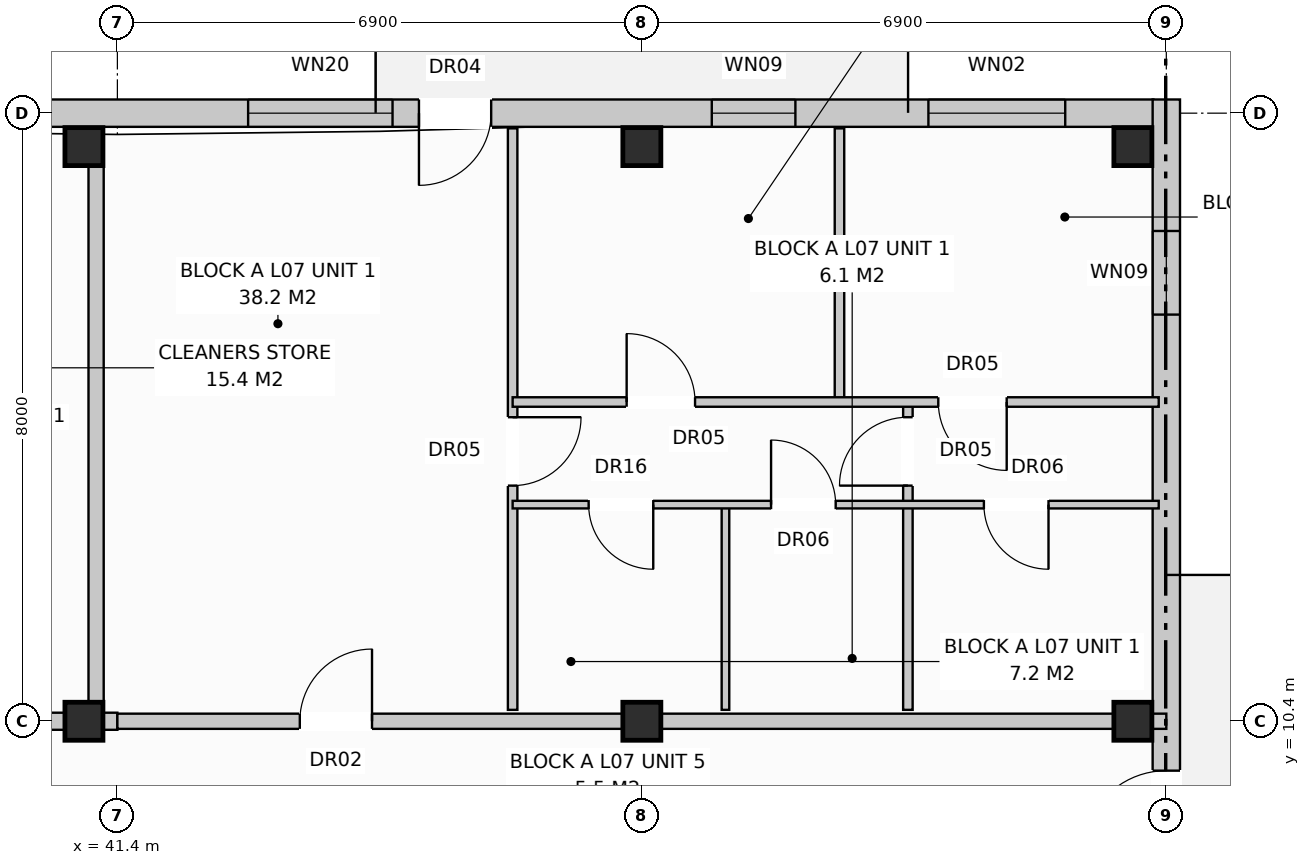
"""IFC4 building model, lengths in metres.
Left out: names, types, materials, properties, quantities, classifications, styles, units other than length and angle.
Written with IfcOpenShell. Run it as: python <this file> out.ifc"""

import sys

from ifc_helpers import new_model, si_unit, direction, frame, frame_2d, origin, origin_with_axes, origin_2d, place, context, subcontext, project, spatial, rectangle, extrude, element, fill, save


model = new_model("IFC4")
c1 = context("Model", 3, precision=1e-05, world=origin(), true_north=direction((0.0, 1.0)))
c2 = subcontext(c1, "Body", "Model", "MODEL_VIEW")
j1 = project(units=[si_unit("LENGTHUNIT", "METRE"), si_unit("PLANEANGLEUNIT", "RADIAN")], contexts=[c1])
p1 = place(None, origin())
s1 = spatial("IfcSite", under=j1, at=p1, CompositionType="ELEMENT")
p2 = place(p1, origin())
s2 = spatial("IfcBuilding", under=s1, at=p2, CompositionType="ELEMENT")
p3 = place(p2, frame((0.0, 0.0, 24.0)))
s3 = spatial("IfcBuildingStorey", under=s2, at=p3, CompositionType="ELEMENT", Elevation=24.0)
for number, where, z_axis, x_axis in (
    (1, (40.96, 10.4, 0.0), (0.0, 0.0, 1.0), (1.0, 0.0, 0.0)),
    (2, (40.96, 17.96, 0.0), (0.0, 0.0, 1.0), (1.0, 0.0, 0.0)),
    (3, (48.3, 10.4, 0.0), (0.0, 0.0, 1.0), (1.0, 0.0, 0.0)),
    (4, (48.3, 17.96, 0.0), (0.0, 0.0, 1.0), (1.0, 0.0, 0.0)),
    (5, (54.76, 10.4, 0.0), (0.0, 0.0, 1.0), (1.0, 0.0, 0.0)),
    (6, (54.76, 17.96, 0.0), (0.0, 0.0, 1.0), (1.0, 0.0, 0.0)),
):
    element("IfcColumn", number, at=place(p3, frame(where, z_axis=z_axis, x_axis=x_axis)), inside=s3, PredefinedType="COLUMN", context=c2, shape_type="SweptSolid", body=[
        extrude(rectangle(XDim=0.5, YDim=0.5, at=origin_2d()), origin(), (0.0, 0.0, 1.0), 3.2),
    ])
p4 = place(p3, frame((31.35, 18.4, 0.0), z_axis=(0.0, 0.0, 1.0), x_axis=(1.0, 0.0, 0.0)))
e7 = element("IfcWall", 7, at=p4, inside=s3, PredefinedType="STANDARD", context=c2, shape_type="SweptSolid", body=[
    extrude(rectangle(XDim=23.68, YDim=0.36, at=frame_2d((11.84, 0.0))), origin(), (0.0, 0.0, 1.0), 2.95),
])
p5 = place(p4, frame((14.018, 0.0, 0.0)))
e8 = element("IfcOpeningElement", 8, at=p5, cuts=e7, PredefinedType="OPENING", context=c2, shape_type="SweptSolid", body=[
    extrude(rectangle(XDim=0.95, YDim=2.1, at=frame_2d((0.475, 1.05))), frame((0.0, 0.192, 0.0), z_axis=(0.0, -1.0, 0.0), x_axis=(1.0, 0.0, 0.0)), (0.0, 0.0, 1.0), 0.384),
])
p6 = place(p4, frame((11.77, 0.0, 0.8)))
e9 = element("IfcOpeningElement", 9, at=p6, cuts=e7, PredefinedType="OPENING", context=c2, shape_type="SweptSolid", body=[
    extrude(rectangle(XDim=1.9, YDim=1.85, at=frame_2d((0.95, 0.925))), frame((0.0, 0.192, 0.0), z_axis=(0.0, -1.0, 0.0), x_axis=(1.0, 0.0, 0.0)), (0.0, 0.0, 1.0), 0.384),
])
p7 = place(p4, frame((17.87, 0.0, 0.72)))
e10 = element("IfcOpeningElement", 10, at=p7, cuts=e7, PredefinedType="OPENING", context=c2, shape_type="SweptSolid", body=[
    extrude(rectangle(XDim=1.1, YDim=1.5, at=frame_2d((0.55, 0.75))), frame((0.0, 0.192, 0.0), z_axis=(0.0, -1.0, 0.0), x_axis=(1.0, 0.0, 0.0)), (0.0, 0.0, 1.0), 0.384),
])
p8 = place(p4, frame((20.72, 0.0, 0.8)))
e11 = element("IfcOpeningElement", 11, at=p8, cuts=e7, PredefinedType="OPENING", context=c2, shape_type="SweptSolid", body=[
    extrude(rectangle(XDim=1.8, YDim=1.7, at=frame_2d((0.9, 0.85))), frame((0.0, 0.192, 0.0), z_axis=(0.0, -1.0, 0.0), x_axis=(1.0, 0.0, 0.0)), (0.0, 0.0, 1.0), 0.384),
])
p9 = place(p3, frame((55.2, -0.18, 0.0), z_axis=(0.0, 0.0, 1.0), x_axis=(0.0, 1.0, 0.0)))
e12 = element("IfcWall", 12, at=p9, inside=s3, PredefinedType="STANDARD", context=c2, shape_type="SweptSolid", body=[
    extrude(rectangle(XDim=18.76, YDim=0.36, at=frame_2d((9.38, 0.0))), origin(), (0.0, 0.0, 1.0), 2.95),
])
p10 = place(p9, frame((8.83, 0.0, 0.0)))
e13 = element("IfcOpeningElement", 13, at=p10, cuts=e12, PredefinedType="OPENING", context=c2, shape_type="SweptSolid", body=[
    extrude(rectangle(XDim=1.1, YDim=2.1, at=frame_2d((0.55, 1.05))), frame((0.0, 0.192, 0.0), z_axis=(0.0, -1.0, 0.0), x_axis=(1.0, 0.0, 0.0)), (0.0, 0.0, 1.0), 0.384),
])
p11 = place(p9, frame((1.73, 0.0, 0.72)))
e14 = element("IfcOpeningElement", 14, at=p11, cuts=e12, PredefinedType="OPENING", context=c2, shape_type="SweptSolid", body=[
    extrude(rectangle(XDim=1.1, YDim=1.5, at=frame_2d((0.55, 0.75))), frame((0.0, 0.192, 0.0), z_axis=(0.0, -1.0, 0.0), x_axis=(1.0, 0.0, 0.0)), (0.0, 0.0, 1.0), 0.384),
])
p12 = place(p9, frame((15.93, 0.0, 0.72)))
e15 = element("IfcOpeningElement", 15, at=p12, cuts=e12, PredefinedType="OPENING", context=c2, shape_type="SweptSolid", body=[
    extrude(rectangle(XDim=1.1, YDim=1.5, at=frame_2d((0.55, 0.75))), frame((0.0, 0.192, 0.0), z_axis=(0.0, -1.0, 0.0), x_axis=(1.0, 0.0, 0.0)), (0.0, 0.0, 1.0), 0.384),
])
p13 = place(p3, frame((41.12, 10.6, 0.0), z_axis=(0.0, 0.0, 1.0), x_axis=(0.0, 1.0, 0.0)))
e16 = element("IfcWall", 16, at=p13, inside=s3, PredefinedType="PARTITIONING", context=c2, shape_type="SweptSolid", body=[
    extrude(rectangle(XDim=7.6, YDim=0.2, at=frame_2d((3.8, 0.0))), origin(), (0.0, 0.0, 1.0), 2.95),
])
p14 = place(p3, frame((31.5, 10.4, 0.0), z_axis=(0.0, 0.0, 1.0), x_axis=(1.0, 0.0, 0.0)))
e17 = element("IfcWall", 17, at=p14, inside=s3, PredefinedType="PARTITIONING", context=c2, shape_type="SweptSolid", body=[
    extrude(rectangle(XDim=9.9, YDim=0.225, at=frame_2d((4.95, 0.0))), origin(), (0.0, 0.0, 1.0), 2.39),
])
p15 = place(p14, frame((0.475, 0.0, 0.0)))
e18 = element("IfcOpeningElement", 18, at=p15, cuts=e17, PredefinedType="OPENING", context=c2, shape_type="SweptSolid", body=[
    extrude(rectangle(XDim=1.1, YDim=2.15, at=frame_2d((0.55, 1.075))), frame((0.0, 0.125, 0.0), z_axis=(0.0, -1.0, 0.0), x_axis=(1.0, 0.0, 0.0)), (0.0, 0.0, 1.0), 0.249),
])
p16 = place(p14, frame((5.75, 0.0, 0.0)))
e19 = element("IfcOpeningElement", 19, at=p16, cuts=e17, PredefinedType="OPENING", context=c2, shape_type="SweptSolid", body=[
    extrude(rectangle(XDim=0.9, YDim=2.1, at=frame_2d((0.45, 1.05))), frame((0.0, 0.125, 0.0), z_axis=(0.0, -1.0, 0.0), x_axis=(1.0, 0.0, 0.0)), (0.0, 0.0, 1.0), 0.249),
])
p17 = place(p14, frame((7.8, 0.0, 0.0)))
e20 = element("IfcOpeningElement", 20, at=p17, cuts=e17, PredefinedType="OPENING", context=c2, shape_type="SweptSolid", body=[
    extrude(rectangle(XDim=0.95, YDim=2.15, at=frame_2d((0.475, 1.075))), frame((0.0, 0.125, 0.0), z_axis=(0.0, -1.0, 0.0), x_axis=(1.0, 0.0, 0.0)), (0.0, 0.0, 1.0), 0.249),
])
p18 = place(p3, frame((41.4, 10.4, 0.0), z_axis=(0.0, 0.0, 1.0), x_axis=(1.0, 0.0, 0.0)))
e21 = element("IfcWall", 21, at=p18, inside=s3, PredefinedType="PARTITIONING", context=c2, shape_type="SweptSolid", body=[
    extrude(rectangle(XDim=13.8, YDim=0.2, at=frame_2d((6.9, 0.0))), origin(), (0.0, 0.0, 1.0), 2.39),
])
p19 = place(p18, frame((2.4, 0.0, 0.0)))
e22 = element("IfcOpeningElement", 22, at=p19, cuts=e21, PredefinedType="OPENING", context=c2, shape_type="SweptSolid", body=[
    extrude(rectangle(XDim=0.95, YDim=2.15, at=frame_2d((0.475, 1.075))), frame((0.0, 0.112, 0.0), z_axis=(0.0, -1.0, 0.0), x_axis=(1.0, 0.0, 0.0)), (0.0, 0.0, 1.0), 0.224),
])
p20 = place(p3, frame((46.6, 10.55, 0.0), z_axis=(0.0, 0.0, 1.0), x_axis=(0.0, 1.0, 0.0)))
e23 = element("IfcWall", 23, at=p20, inside=s3, PredefinedType="PARTITIONING", context=c2, shape_type="SweptSolid", body=[
    extrude(rectangle(XDim=7.65, YDim=0.125, at=frame_2d((3.825, 0.0))), origin(), (0.0, 0.0, 1.0), 2.95),
])
p21 = place(p20, frame((2.95, 0.0, 0.0)))
e24 = element("IfcOpeningElement", 24, at=p21, cuts=e23, PredefinedType="OPENING", context=c2, shape_type="SweptSolid", body=[
    extrude(rectangle(XDim=0.9, YDim=2.1, at=frame_2d((0.45, 1.05))), frame((0.0, 0.074, 0.0), z_axis=(0.0, -1.0, 0.0), x_axis=(1.0, 0.0, 0.0)), (0.0, 0.0, 1.0), 0.149),
])
p22 = place(p3, frame((49.4, 10.55, 0.0), z_axis=(0.0, 0.0, 1.0), x_axis=(0.0, 1.0, 0.0)))
e25 = element("IfcWall", 25, at=p22, inside=s3, PredefinedType="PARTITIONING", context=c2, shape_type="SweptSolid", body=[
    extrude(rectangle(XDim=2.7, YDim=0.1, at=frame_2d((1.35, 0.0))), origin(), (0.0, 0.0, 1.0), 2.95),
])
p23 = place(p3, frame((51.8, 10.55, 0.0), z_axis=(0.0, 0.0, 1.0), x_axis=(0.0, 1.0, 0.0)))
e26 = element("IfcWall", 26, at=p23, inside=s3, PredefinedType="PARTITIONING", context=c2, shape_type="SweptSolid", body=[
    extrude(rectangle(XDim=4.05, YDim=0.125, at=frame_2d((2.025, 0.0))), origin(), (0.0, 0.0, 1.0), 2.95),
])
p24 = place(p23, frame((2.95, 0.0, 0.0)))
e27 = element("IfcOpeningElement", 27, at=p24, cuts=e26, PredefinedType="OPENING", context=c2, shape_type="SweptSolid", body=[
    extrude(rectangle(XDim=0.9, YDim=2.1, at=frame_2d((0.45, 1.05))), frame((0.0, 0.074, 0.0), z_axis=(0.0, -1.0, 0.0), x_axis=(1.0, 0.0, 0.0)), (0.0, 0.0, 1.0), 0.149),
])
p25 = place(p3, frame((50.9, 14.6, 0.0), z_axis=(0.0, 0.0, 1.0), x_axis=(0.0, 1.0, 0.0)))
e28 = element("IfcWall", 28, at=p25, inside=s3, PredefinedType="PARTITIONING", context=c2, shape_type="SweptSolid", body=[
    extrude(rectangle(XDim=3.6, YDim=0.125, at=frame_2d((1.8, 0.0))), origin(), (0.0, 0.0, 1.0), 2.59),
])
p26 = place(p3, frame((46.6, 13.25, 0.0), z_axis=(0.0, 0.0, 1.0), x_axis=(1.0, 0.0, 0.0)))
e29 = element("IfcWall", 29, at=p26, inside=s3, PredefinedType="PARTITIONING", context=c2, shape_type="SweptSolid", body=[
    extrude(rectangle(XDim=8.5, YDim=0.1, at=frame_2d((4.25, 0.0))), origin(), (0.0, 0.0, 1.0), 2.95),
])
p27 = place(p26, frame((1.0, 0.0, 0.0)))
e30 = element("IfcOpeningElement", 30, at=p27, cuts=e29, PredefinedType="OPENING", context=c2, shape_type="SweptSolid", body=[
    extrude(rectangle(XDim=0.85, YDim=2.1, at=frame_2d((0.425, 1.05))), frame((0.0, 0.062, 0.0), z_axis=(0.0, -1.0, 0.0), x_axis=(1.0, 0.0, 0.0)), (0.0, 0.0, 1.0), 0.124),
])
p28 = place(p26, frame((3.4, 0.0, 0.0)))
e31 = element("IfcOpeningElement", 31, at=p28, cuts=e29, PredefinedType="OPENING", context=c2, shape_type="SweptSolid", body=[
    extrude(rectangle(XDim=0.85, YDim=2.05, at=frame_2d((0.425, 1.025))), frame((0.0, 0.062, 0.0), z_axis=(0.0, -1.0, 0.0), x_axis=(1.0, 0.0, 0.0)), (0.0, 0.0, 1.0), 0.124),
])
p29 = place(p26, frame((6.2, 0.0, 0.0)))
e32 = element("IfcOpeningElement", 32, at=p29, cuts=e29, PredefinedType="OPENING", context=c2, shape_type="SweptSolid", body=[
    extrude(rectangle(XDim=0.85, YDim=2.05, at=frame_2d((0.425, 1.025))), frame((0.0, 0.062, 0.0), z_axis=(0.0, -1.0, 0.0), x_axis=(1.0, 0.0, 0.0)), (0.0, 0.0, 1.0), 0.124),
])
p30 = place(p3, frame((46.6, 14.6, 0.0), z_axis=(0.0, 0.0, 1.0), x_axis=(1.0, 0.0, 0.0)))
e33 = element("IfcWall", 33, at=p30, inside=s3, PredefinedType="PARTITIONING", context=c2, shape_type="SweptSolid", body=[
    extrude(rectangle(XDim=8.5, YDim=0.125, at=frame_2d((4.25, 0.0))), origin(), (0.0, 0.0, 1.0), 2.95),
])
p31 = place(p30, frame((1.5, 0.0, 0.0)))
e34 = element("IfcOpeningElement", 34, at=p31, cuts=e33, PredefinedType="OPENING", context=c2, shape_type="SweptSolid", body=[
    extrude(rectangle(XDim=0.9, YDim=2.1, at=frame_2d((0.45, 1.05))), frame((0.0, 0.074, 0.0), z_axis=(0.0, -1.0, 0.0), x_axis=(1.0, 0.0, 0.0)), (0.0, 0.0, 1.0), 0.149),
])
p32 = place(p30, frame((5.6, 0.0, 0.0)))
e35 = element("IfcOpeningElement", 35, at=p32, cuts=e33, PredefinedType="OPENING", context=c2, shape_type="SweptSolid", body=[
    extrude(rectangle(XDim=0.9, YDim=2.1, at=frame_2d((0.45, 1.05))), frame((0.0, 0.074, 0.0), z_axis=(0.0, -1.0, 0.0), x_axis=(1.0, 0.0, 0.0)), (0.0, 0.0, 1.0), 0.149),
])
p33 = place(p5, frame((0.95, 0.0, 0.0), z_axis=(0.0, 0.0, 1.0), x_axis=(-1.0, 0.0, 0.0)))
e36 = element("IfcDoor", 36, at=p33, inside=s3, OperationType="SINGLE_SWING_LEFT", PredefinedType="DOOR", context=c2, shape_type="SweptSolid", body=[
    extrude(rectangle(XDim=0.95, YDim=2.1, at=frame_2d((0.475, 1.05))), frame((0.0, 0.025, 0.0), z_axis=(0.0, -1.0, 0.0), x_axis=(1.0, 0.0, 0.0)), (0.0, 0.0, 1.0), 0.05),
])
fill(e8, e36)
p34 = place(p6, origin_with_axes())
e37 = element("IfcWindow", 37, at=p34, inside=s3, PartitioningType="SINGLE_PANEL", PredefinedType="WINDOW", context=c2, shape_type="SweptSolid", body=[
    extrude(rectangle(XDim=1.9, YDim=1.85, at=frame_2d((0.95, 0.925))), frame((0.0, 0.03, 0.0), z_axis=(0.0, -1.0, 0.0), x_axis=(1.0, 0.0, 0.0)), (0.0, 0.0, 1.0), 0.06),
])
fill(e9, e37)
p35 = place(p7, origin_with_axes())
e38 = element("IfcWindow", 38, at=p35, inside=s3, PartitioningType="SINGLE_PANEL", PredefinedType="WINDOW", context=c2, shape_type="SweptSolid", body=[
    extrude(rectangle(XDim=1.1, YDim=1.5, at=frame_2d((0.55, 0.75))), frame((0.0, 0.03, 0.0), z_axis=(0.0, -1.0, 0.0), x_axis=(1.0, 0.0, 0.0)), (0.0, 0.0, 1.0), 0.06),
])
fill(e10, e38)
p36 = place(p8, origin_with_axes())
e39 = element("IfcWindow", 39, at=p36, inside=s3, PartitioningType="SINGLE_PANEL", PredefinedType="WINDOW", context=c2, shape_type="SweptSolid", body=[
    extrude(rectangle(XDim=1.8, YDim=1.7, at=frame_2d((0.9, 0.85))), frame((0.0, 0.03, 0.0), z_axis=(0.0, -1.0, 0.0), x_axis=(1.0, 0.0, 0.0)), (0.0, 0.0, 1.0), 0.06),
])
fill(e11, e39)
p37 = place(p10, origin_with_axes())
e40 = element("IfcDoor", 40, at=p37, inside=s3, OperationType="SINGLE_SWING_LEFT", PredefinedType="DOOR", context=c2, shape_type="SweptSolid", body=[
    extrude(rectangle(XDim=1.1, YDim=2.1, at=frame_2d((0.55, 1.05))), frame((0.0, 0.025, 0.0), z_axis=(0.0, -1.0, 0.0), x_axis=(1.0, 0.0, 0.0)), (0.0, 0.0, 1.0), 0.05),
])
fill(e13, e40)
p38 = place(p12, origin_with_axes())
e41 = element("IfcWindow", 41, at=p38, inside=s3, PartitioningType="SINGLE_PANEL", PredefinedType="WINDOW", context=c2, shape_type="SweptSolid", body=[
    extrude(rectangle(XDim=1.1, YDim=1.5, at=frame_2d((0.55, 0.75))), frame((0.0, 0.03, 0.0), z_axis=(0.0, -1.0, 0.0), x_axis=(1.0, 0.0, 0.0)), (0.0, 0.0, 1.0), 0.06),
])
fill(e15, e41)
p39 = place(p19, origin_with_axes())
e42 = element("IfcDoor", 42, at=p39, inside=s3, OperationType="SINGLE_SWING_RIGHT", PredefinedType="DOOR", context=c2, shape_type="SweptSolid", body=[
    extrude(rectangle(XDim=0.95, YDim=2.15, at=frame_2d((0.475, 1.075))), frame((0.0, 0.025, 0.0), z_axis=(0.0, -1.0, 0.0), x_axis=(1.0, 0.0, 0.0)), (0.0, 0.0, 1.0), 0.05),
])
fill(e22, e42)
p40 = place(p21, frame((0.9, 0.0, 0.0), z_axis=(0.0, 0.0, 1.0), x_axis=(-1.0, 0.0, 0.0)))
e43 = element("IfcDoor", 43, at=p40, inside=s3, OperationType="SINGLE_SWING_RIGHT", PredefinedType="DOOR", context=c2, shape_type="SweptSolid", body=[
    extrude(rectangle(XDim=0.9, YDim=2.1, at=frame_2d((0.45, 1.05))), frame((0.0, 0.025, 0.0), z_axis=(0.0, -1.0, 0.0), x_axis=(1.0, 0.0, 0.0)), (0.0, 0.0, 1.0), 0.05),
])
fill(e24, e43)
p41 = place(p24, origin_with_axes())
e44 = element("IfcDoor", 44, at=p41, inside=s3, OperationType="SINGLE_SWING_LEFT", PredefinedType="DOOR", context=c2, shape_type="SweptSolid", body=[
    extrude(rectangle(XDim=0.9, YDim=2.1, at=frame_2d((0.45, 1.05))), frame((0.0, 0.025, 0.0), z_axis=(0.0, -1.0, 0.0), x_axis=(1.0, 0.0, 0.0)), (0.0, 0.0, 1.0), 0.05),
])
fill(e27, e44)
p42 = place(p27, frame((0.85, 0.0, 0.0), z_axis=(0.0, 0.0, 1.0), x_axis=(-1.0, 0.0, 0.0)))
e45 = element("IfcDoor", 45, at=p42, inside=s3, OperationType="SINGLE_SWING_RIGHT", PredefinedType="DOOR", context=c2, shape_type="SweptSolid", body=[
    extrude(rectangle(XDim=0.85, YDim=2.1, at=frame_2d((0.425, 1.05))), frame((0.0, 0.025, 0.0), z_axis=(0.0, -1.0, 0.0), x_axis=(1.0, 0.0, 0.0)), (0.0, 0.0, 1.0), 0.05),
])
fill(e30, e45)
p43 = place(p28, origin_with_axes())
e46 = element("IfcDoor", 46, at=p43, inside=s3, OperationType="SINGLE_SWING_LEFT", PredefinedType="DOOR", context=c2, shape_type="SweptSolid", body=[
    extrude(rectangle(XDim=0.85, YDim=2.05, at=frame_2d((0.425, 1.025))), frame((0.0, 0.025, 0.0), z_axis=(0.0, -1.0, 0.0), x_axis=(1.0, 0.0, 0.0)), (0.0, 0.0, 1.0), 0.05),
])
fill(e31, e46)
p44 = place(p29, frame((0.85, 0.0, 0.0), z_axis=(0.0, 0.0, 1.0), x_axis=(-1.0, 0.0, 0.0)))
e47 = element("IfcDoor", 47, at=p44, inside=s3, OperationType="SINGLE_SWING_RIGHT", PredefinedType="DOOR", context=c2, shape_type="SweptSolid", body=[
    extrude(rectangle(XDim=0.85, YDim=2.05, at=frame_2d((0.425, 1.025))), frame((0.0, 0.025, 0.0), z_axis=(0.0, -1.0, 0.0), x_axis=(1.0, 0.0, 0.0)), (0.0, 0.0, 1.0), 0.05),
])
fill(e32, e47)
p45 = place(p31, origin_with_axes())
e48 = element("IfcDoor", 48, at=p45, inside=s3, OperationType="SINGLE_SWING_LEFT", PredefinedType="DOOR", context=c2, shape_type="SweptSolid", body=[
    extrude(rectangle(XDim=0.9, YDim=2.1, at=frame_2d((0.45, 1.05))), frame((0.0, 0.025, 0.0), z_axis=(0.0, -1.0, 0.0), x_axis=(1.0, 0.0, 0.0)), (0.0, 0.0, 1.0), 0.05),
])
fill(e34, e48)
p46 = place(p32, frame((0.9, 0.0, 0.0), z_axis=(0.0, 0.0, 1.0), x_axis=(-1.0, 0.0, 0.0)))
e49 = element("IfcDoor", 49, at=p46, inside=s3, OperationType="SINGLE_SWING_RIGHT", PredefinedType="DOOR", context=c2, shape_type="SweptSolid", body=[
    extrude(rectangle(XDim=0.9, YDim=2.1, at=frame_2d((0.45, 1.05))), frame((0.0, 0.025, 0.0), z_axis=(0.0, -1.0, 0.0), x_axis=(1.0, 0.0, 0.0)), (0.0, 0.0, 1.0), 0.05),
])
fill(e35, e49)
save(model, sys.argv[1])
